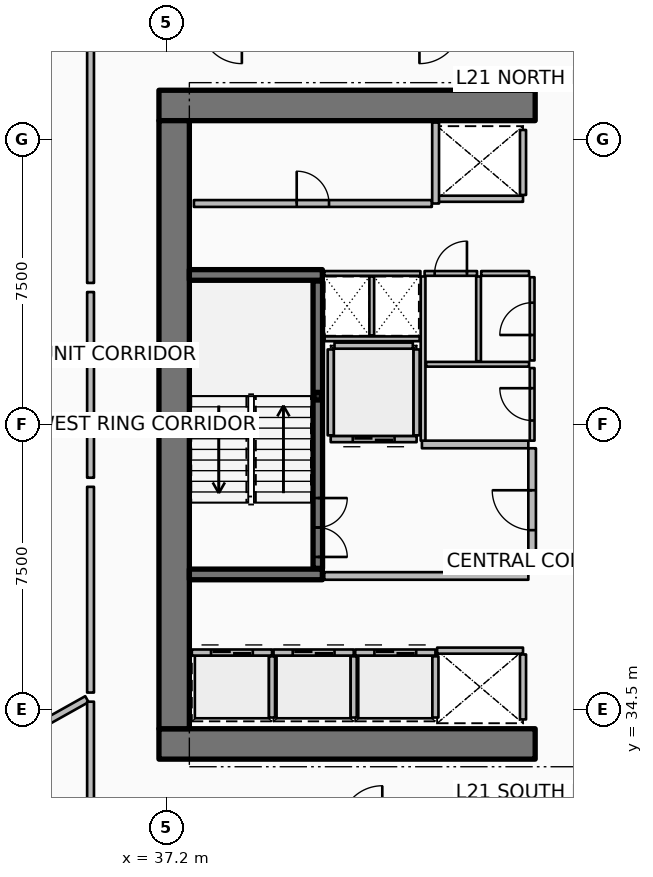
"""IFC4 building model, lengths in metres.
Left out: names, types, materials, properties, quantities, classifications, styles, units other than length and angle.
Written with IfcOpenShell. Run it as: python <this file> out.ifc"""

import sys

from ifc_helpers import new_model, si_unit, direction, frame, frame_2d, origin, origin_2d, place, context, subcontext, project, spatial, rectangle, hollow_rectangle, extrude, element, fill, save


model = new_model("IFC4")
c1 = context("Model", 3, precision=1e-05, world=origin(), true_north=direction((0.0, 1.0)))
c2 = subcontext(c1, "Body", "Model", "MODEL_VIEW")
j1 = project(units=[si_unit("LENGTHUNIT", "METRE"), si_unit("PLANEANGLEUNIT", "RADIAN")], contexts=[c1])
p1 = place(None, origin())
s1 = spatial("IfcSite", under=j1, at=p1, CompositionType="ELEMENT")
p2 = place(p1, origin())
s2 = spatial("IfcBuilding", under=s1, at=p2, CompositionType="ELEMENT")
p3 = place(p2, frame((0.0, 0.0, 86.4)))
s3 = spatial("IfcBuildingStorey", under=s2, at=p3, CompositionType="ELEMENT", Elevation=86.4)
for number, where, z_axis, x_axis in (
    (1, (37.0, 33.6, 0.0), (0.0, 0.0, 1.0), (1.0, 0.0, 0.0)),
    (2, (37.0, 50.4, 0.0), (0.0, 0.0, 1.0), (1.0, 0.0, 0.0)),
):
    element("IfcWall", number, at=place(p3, frame(where, z_axis=z_axis, x_axis=x_axis)), inside=s3, PredefinedType="SHEAR", context=c2, shape_type="SweptSolid", body=[
        extrude(rectangle(XDim=9.9, YDim=0.8, at=frame_2d((4.95, 0.0))), origin(), (0.0, 0.0, 1.0), 3.75),
    ])
p4 = place(p3, frame((37.4, 34.0, 0.0), z_axis=(0.0, 0.0, 1.0), x_axis=(0.0, 1.0, 0.0)))
e3 = element("IfcWall", 3, at=p4, inside=s3, PredefinedType="SHEAR", context=c2, shape_type="SweptSolid", body=[
    extrude(rectangle(XDim=16.0, YDim=0.8, at=frame_2d((8.0, 0.0))), origin(), (0.0, 0.0, 1.0), 3.75),
])
for number, where, z_axis, x_axis in (
    (4, (37.8, 38.06, 0.0), (0.0, 0.0, 1.0), (1.0, 0.0, 0.0)),
    (5, (37.8, 45.94, 0.0), (0.0, 0.0, 1.0), (1.0, 0.0, 0.0)),
):
    element("IfcWall", number, at=place(p3, frame(where, z_axis=z_axis, x_axis=x_axis)), inside=s3, PredefinedType="SHEAR", context=c2, shape_type="SweptSolid", body=[
        extrude(rectangle(XDim=3.5, YDim=0.28, at=frame_2d((1.75, 0.0))), origin(), (0.0, 0.0, 1.0), 3.75),
    ])
p5 = place(p3, frame((41.18, 42.75, 0.0), z_axis=(0.0, 0.0, 1.0), x_axis=(1.0, 0.0, 0.0)))
e6 = element("IfcColumn", 6, at=p5, inside=s3, PredefinedType="COLUMN", context=c2, shape_type="SweptSolid", body=[
    extrude(hollow_rectangle(XDim=0.2, YDim=0.2, WallThickness=0.01, InnerFilletRadius=0.01, OuterFilletRadius=0.02, at=origin_2d()), origin(), (0.0, 0.0, 1.0), 1.67),
])
p6 = place(p3, frame((41.18, 38.22, 0.0), z_axis=(0.0, 0.0, 1.0), x_axis=(0.0, 1.0, 0.0)))
e7 = element("IfcWall", 7, at=p6, inside=s3, PredefinedType="SOLIDWALL", context=c2, shape_type="SweptSolid", body=[
    extrude(rectangle(XDim=7.56, YDim=0.25, at=frame_2d((3.78, 0.0))), origin(), (0.0, 0.0, 1.0), 3.5),
])
p7 = place(p6, frame((0.3, 0.0, 0.0)))
e8 = element("IfcOpeningElement", 8, at=p7, cuts=e7, PredefinedType="OPENING", context=c2, shape_type="SweptSolid", body=[
    extrude(rectangle(XDim=1.55, YDim=2.15, at=frame_2d((0.775, 1.075))), frame((0.0, 0.135, 0.0), z_axis=(0.0, -1.0, 0.0), x_axis=(1.0, 0.0, 0.0)), (0.0, 0.0, 1.0), 0.27),
])
p8 = place(p3, frame((37.865, 36.005, 0.0), z_axis=(0.0, 0.0, 1.0), x_axis=(1.0, 0.0, 0.0)))
e9 = element("IfcWall", 9, at=p8, inside=s3, PredefinedType="PARTITIONING", context=c2, shape_type="SweptSolid", body=[
    extrude(rectangle(XDim=2.11, YDim=0.16, at=frame_2d((1.055, 0.0))), origin(), (0.0, 0.0, 1.0), 3.5),
])
p9 = place(p8, frame((0.505, 0.0, 0.0)))
e10 = element("IfcOpeningElement", 10, at=p9, cuts=e9, PredefinedType="OPENING", context=c2, shape_type="SweptSolid", body=[
    extrude(rectangle(XDim=1.1, YDim=2.1, at=frame_2d((0.55, 1.05))), frame((0.0, 0.09, 0.0), z_axis=(0.0, -1.0, 0.0), x_axis=(1.0, 0.0, 0.0)), (0.0, 0.0, 1.0), 0.18),
])
p10 = place(p3, frame((39.975, 34.295, 0.0), z_axis=(0.0, 0.0, 1.0), x_axis=(0.0, 1.0, 0.0)))
e11 = element("IfcWall", 11, at=p10, inside=s3, PredefinedType="PARTITIONING", context=c2, shape_type="SweptSolid", body=[
    extrude(rectangle(XDim=1.61, YDim=0.16, at=frame_2d((0.805, 0.0))), origin(), (0.0, 0.0, 1.0), 3.5),
])
p11 = place(p3, frame((40.015, 36.005, 0.0), z_axis=(0.0, 0.0, 1.0), x_axis=(1.0, 0.0, 0.0)))
e12 = element("IfcWall", 12, at=p11, inside=s3, PredefinedType="PARTITIONING", context=c2, shape_type="SweptSolid", body=[
    extrude(rectangle(XDim=2.11, YDim=0.16, at=frame_2d((1.055, 0.0))), origin(), (0.0, 0.0, 1.0), 3.5),
])
p12 = place(p11, frame((0.505, 0.0, 0.0)))
e13 = element("IfcOpeningElement", 13, at=p12, cuts=e12, PredefinedType="OPENING", context=c2, shape_type="SweptSolid", body=[
    extrude(rectangle(XDim=1.1, YDim=2.1, at=frame_2d((0.55, 1.05))), frame((0.0, 0.09, 0.0), z_axis=(0.0, -1.0, 0.0), x_axis=(1.0, 0.0, 0.0)), (0.0, 0.0, 1.0), 0.18),
])
p13 = place(p3, frame((42.125, 34.295, 0.0), z_axis=(0.0, 0.0, 1.0), x_axis=(0.0, 1.0, 0.0)))
e14 = element("IfcWall", 14, at=p13, inside=s3, PredefinedType="PARTITIONING", context=c2, shape_type="SweptSolid", body=[
    extrude(rectangle(XDim=1.61, YDim=0.16, at=frame_2d((0.805, 0.0))), origin(), (0.0, 0.0, 1.0), 3.5),
])
p14 = place(p3, frame((42.165, 36.005, 0.0), z_axis=(0.0, 0.0, 1.0), x_axis=(1.0, 0.0, 0.0)))
e15 = element("IfcWall", 15, at=p14, inside=s3, PredefinedType="PARTITIONING", context=c2, shape_type="SweptSolid", body=[
    extrude(rectangle(XDim=2.11, YDim=0.16, at=frame_2d((1.055, 0.0))), origin(), (0.0, 0.0, 1.0), 3.5),
])
p15 = place(p14, frame((0.505, 0.0, 0.0)))
e16 = element("IfcOpeningElement", 16, at=p15, cuts=e15, PredefinedType="OPENING", context=c2, shape_type="SweptSolid", body=[
    extrude(rectangle(XDim=1.1, YDim=2.1, at=frame_2d((0.55, 1.05))), frame((0.0, 0.09, 0.0), z_axis=(0.0, -1.0, 0.0), x_axis=(1.0, 0.0, 0.0)), (0.0, 0.0, 1.0), 0.18),
])
p16 = place(p3, frame((44.275, 34.295, 0.0), z_axis=(0.0, 0.0, 1.0), x_axis=(0.0, 1.0, 0.0)))
e17 = element("IfcWall", 17, at=p16, inside=s3, PredefinedType="PARTITIONING", context=c2, shape_type="SweptSolid", body=[
    extrude(rectangle(XDim=1.61, YDim=0.16, at=frame_2d((0.805, 0.0))), origin(), (0.0, 0.0, 1.0), 3.5),
])
p17 = place(p3, frame((46.58, 47.945, 0.0), z_axis=(0.0, 0.0, 1.0), x_axis=(-1.0, 0.0, 0.0)))
e18 = element("IfcWall", 18, at=p17, inside=s3, PredefinedType="PARTITIONING", context=c2, shape_type="SweptSolid", body=[
    extrude(rectangle(XDim=2.26, YDim=0.16, at=frame_2d((1.13, 0.0))), origin(), (0.0, 0.0, 1.0), 3.5),
])
p18 = place(p3, frame((46.58, 48.045, 0.0), z_axis=(0.0, 0.0, 1.0), x_axis=(0.0, 1.0, 0.0)))
e19 = element("IfcWall", 19, at=p18, inside=s3, PredefinedType="PARTITIONING", context=c2, shape_type="SweptSolid", body=[
    extrude(rectangle(XDim=1.71, YDim=0.16, at=frame_2d((0.855, 0.0))), origin(), (0.0, 0.0, 1.0), 3.5),
])
p19 = place(p3, frame((44.32, 36.055, 0.0), z_axis=(0.0, 0.0, 1.0), x_axis=(1.0, 0.0, 0.0)))
e20 = element("IfcWall", 20, at=p19, inside=s3, PredefinedType="PARTITIONING", context=c2, shape_type="SweptSolid", body=[
    extrude(rectangle(XDim=2.26, YDim=0.16, at=frame_2d((1.13, 0.0))), origin(), (0.0, 0.0, 1.0), 3.5),
])
p20 = place(p3, frame((46.58, 34.245, 0.0), z_axis=(0.0, 0.0, 1.0), x_axis=(0.0, 1.0, 0.0)))
e21 = element("IfcWall", 21, at=p20, inside=s3, PredefinedType="PARTITIONING", context=c2, shape_type="SweptSolid", body=[
    extrude(rectangle(XDim=1.71, YDim=0.16, at=frame_2d((0.855, 0.0))), origin(), (0.0, 0.0, 1.0), 3.5),
])
p21 = place(p3, frame((43.78, 41.62, 0.0), z_axis=(0.0, 0.0, 1.0), x_axis=(-1.0, 0.0, 0.0)))
e22 = element("IfcWall", 22, at=p21, inside=s3, PredefinedType="PARTITIONING", context=c2, shape_type="SweptSolid", body=[
    extrude(rectangle(XDim=2.26, YDim=0.16, at=frame_2d((1.13, 0.0))), origin(), (0.0, 0.0, 1.0), 3.5),
])
p22 = place(p21, frame((0.58, 0.0, 0.0)))
e23 = element("IfcOpeningElement", 23, at=p22, cuts=e22, PredefinedType="OPENING", context=c2, shape_type="SweptSolid", body=[
    extrude(rectangle(XDim=1.1, YDim=2.1, at=frame_2d((0.55, 1.05))), frame((0.0, 0.09, 0.0), z_axis=(0.0, -1.0, 0.0), x_axis=(1.0, 0.0, 0.0)), (0.0, 0.0, 1.0), 0.18),
])
for number, where, z_axis, x_axis in (
    (24, (43.78, 41.72, 0.0), (0.0, 0.0, 1.0), (0.0, 1.0, 0.0)),
    (25, (41.52, 41.72, 0.0), (0.0, 0.0, 1.0), (0.0, 1.0, 0.0)),
):
    element("IfcWall", number, at=place(p3, frame(where, z_axis=z_axis, x_axis=x_axis)), inside=s3, PredefinedType="PARTITIONING", context=c2, shape_type="SweptSolid", body=[
        extrude(rectangle(XDim=2.26, YDim=0.16, at=frame_2d((1.13, 0.0))), origin(), (0.0, 0.0, 1.0), 3.5),
    ])
p23 = place(p3, frame((41.62, 44.08, 0.0), z_axis=(0.0, 0.0, 1.0), x_axis=(1.0, 0.0, 0.0)))
e26 = element("IfcWall", 26, at=p23, inside=s3, PredefinedType="PARTITIONING", context=c2, shape_type="SweptSolid", body=[
    extrude(rectangle(XDim=2.06, YDim=0.16, at=frame_2d((1.03, 0.0))), origin(), (0.0, 0.0, 1.0), 3.5),
])
p24 = place(p3, frame((37.92, 47.82, 0.0), z_axis=(0.0, 0.0, 1.0), x_axis=(1.0, 0.0, 0.0)))
e27 = element("IfcWall", 27, at=p24, inside=s3, PredefinedType="PARTITIONING", context=c2, shape_type="SweptSolid", body=[
    extrude(rectangle(XDim=6.26, YDim=0.18, at=frame_2d((3.13, 0.0))), origin(), (0.0, 0.0, 1.0), 3.5),
])
p25 = place(p24, frame((2.705, 0.0, 0.0)))
e28 = element("IfcOpeningElement", 28, at=p25, cuts=e27, PredefinedType="OPENING", context=c2, shape_type="SweptSolid", body=[
    extrude(rectangle(XDim=0.85, YDim=2.06, at=frame_2d((0.425, 1.03))), frame((0.0, 0.1, 0.0), z_axis=(0.0, -1.0, 0.0), x_axis=(1.0, 0.0, 0.0)), (0.0, 0.0, 1.0), 0.2),
])
p26 = place(p3, frame((44.28, 47.82, 0.0), z_axis=(0.0, 0.0, 1.0), x_axis=(0.0, 1.0, 0.0)))
e29 = element("IfcWall", 29, at=p26, inside=s3, PredefinedType="PARTITIONING", context=c2, shape_type="SweptSolid", body=[
    extrude(rectangle(XDim=2.13, YDim=0.18, at=frame_2d((1.065, 0.0))), origin(), (0.0, 0.0, 1.0), 3.5),
])
p27 = place(p3, frame((41.35, 38.02, 0.0), z_axis=(0.0, 0.0, 1.0), x_axis=(1.0, 0.0, 0.0)))
e30 = element("IfcWall", 30, at=p27, inside=s3, PredefinedType="PARTITIONING", context=c2, shape_type="SweptSolid", body=[
    extrude(rectangle(XDim=5.37, YDim=0.2, at=frame_2d((2.685, 0.0))), origin(), (0.0, 0.0, 1.0), 3.5),
])
p28 = place(p3, frame((43.92, 41.48, 0.0), z_axis=(0.0, 0.0, 1.0), x_axis=(1.0, 0.0, 0.0)))
e31 = element("IfcWall", 31, at=p28, inside=s3, PredefinedType="PARTITIONING", context=c2, shape_type="SweptSolid", body=[
    extrude(rectangle(XDim=2.8, YDim=0.2, at=frame_2d((1.4, 0.0))), origin(), (0.0, 0.0, 1.0), 3.5),
])
p29 = place(p3, frame((46.82, 38.12, 0.0), z_axis=(0.0, 0.0, 1.0), x_axis=(0.0, 1.0, 0.0)))
e32 = element("IfcWall", 32, at=p29, inside=s3, PredefinedType="PARTITIONING", context=c2, shape_type="SweptSolid", body=[
    extrude(rectangle(XDim=3.26, YDim=0.2, at=frame_2d((1.63, 0.0))), origin(), (0.0, 0.0, 1.0), 3.5),
])
p30 = place(p29, frame((1.105, 0.0, 0.0)))
e33 = element("IfcOpeningElement", 33, at=p30, cuts=e32, PredefinedType="OPENING", context=c2, shape_type="SweptSolid", body=[
    extrude(rectangle(XDim=1.05, YDim=2.1, at=frame_2d((0.525, 1.05))), frame((0.0, 0.11, 0.0), z_axis=(0.0, -1.0, 0.0), x_axis=(1.0, 0.0, 0.0)), (0.0, 0.0, 1.0), 0.22),
])
p31 = place(p3, frame((41.36, 44.26, 0.0), z_axis=(0.0, 0.0, 1.0), x_axis=(1.0, 0.0, 0.0)))
e34 = element("IfcWall", 34, at=p31, inside=s3, PredefinedType="PARTITIONING", context=c2, shape_type="SweptSolid", body=[
    extrude(rectangle(XDim=2.5, YDim=0.125, at=frame_2d((1.25, 0.0))), origin(), (0.0, 0.0, 1.0), 2.94),
])
p32 = place(p3, frame((42.6, 44.35, 0.0), z_axis=(0.0, 0.0, 1.0), x_axis=(0.0, 1.0, 0.0)))
e35 = element("IfcWall", 35, at=p32, inside=s3, PredefinedType="PARTITIONING", context=c2, shape_type="SweptSolid", body=[
    extrude(rectangle(XDim=1.55, YDim=0.125, at=frame_2d((0.775, 0.0))), origin(), (0.0, 0.0, 1.0), 2.94),
])
p33 = place(p3, frame((43.95, 41.58, 0.0), z_axis=(0.0, 0.0, 1.0), x_axis=(0.0, 1.0, 0.0)))
e36 = element("IfcWall", 36, at=p33, inside=s3, PredefinedType="PARTITIONING", context=c2, shape_type="SweptSolid", body=[
    extrude(rectangle(XDim=4.32, YDim=0.125, at=frame_2d((2.16, 0.0))), origin(), (0.0, 0.0, 1.0), 2.94),
])
p34 = place(p3, frame((44.03, 43.59, 0.0), z_axis=(0.0, 0.0, 1.0), x_axis=(1.0, 0.0, 0.0)))
e37 = element("IfcWall", 37, at=p34, inside=s3, PredefinedType="PARTITIONING", context=c2, shape_type="SweptSolid", body=[
    extrude(rectangle(XDim=2.71, YDim=0.125, at=frame_2d((1.355, 0.0))), origin(), (0.0, 0.0, 1.0), 2.94),
])
p35 = place(p3, frame((45.41, 43.67, 0.0), z_axis=(0.0, 0.0, 1.0), x_axis=(0.0, 1.0, 0.0)))
e38 = element("IfcWall", 38, at=p35, inside=s3, PredefinedType="PARTITIONING", context=c2, shape_type="SweptSolid", body=[
    extrude(rectangle(XDim=2.23, YDim=0.125, at=frame_2d((1.115, 0.0))), origin(), (0.0, 0.0, 1.0), 2.94),
])
p36 = place(p3, frame((46.82, 41.58, 0.0), z_axis=(0.0, 0.0, 1.0), x_axis=(0.0, 1.0, 0.0)))
e39 = element("IfcWall", 39, at=p36, inside=s3, PredefinedType="PARTITIONING", context=c2, shape_type="SweptSolid", body=[
    extrude(rectangle(XDim=1.91, YDim=0.125, at=frame_2d((0.955, 0.0))), origin(), (0.0, 0.0, 1.0), 2.94),
])
p37 = place(p36, frame((0.53, 0.0, 0.0)))
e40 = element("IfcOpeningElement", 40, at=p37, cuts=e39, PredefinedType="OPENING", context=c2, shape_type="SweptSolid", body=[
    extrude(rectangle(XDim=0.85, YDim=2.06, at=frame_2d((0.425, 1.03))), frame((0.0, 0.073, 0.0), z_axis=(0.0, -1.0, 0.0), x_axis=(1.0, 0.0, 0.0)), (0.0, 0.0, 1.0), 0.145),
])
p38 = place(p3, frame((46.82, 43.69, 0.0), z_axis=(0.0, 0.0, 1.0), x_axis=(0.0, 1.0, 0.0)))
e41 = element("IfcWall", 41, at=p38, inside=s3, PredefinedType="PARTITIONING", context=c2, shape_type="SweptSolid", body=[
    extrude(rectangle(XDim=2.19, YDim=0.125, at=frame_2d((1.095, 0.0))), origin(), (0.0, 0.0, 1.0), 2.94),
])
p39 = place(p38, frame((0.67, 0.0, 0.0)))
e42 = element("IfcOpeningElement", 42, at=p39, cuts=e41, PredefinedType="OPENING", context=c2, shape_type="SweptSolid", body=[
    extrude(rectangle(XDim=0.85, YDim=2.06, at=frame_2d((0.425, 1.03))), frame((0.0, 0.073, 0.0), z_axis=(0.0, -1.0, 0.0), x_axis=(1.0, 0.0, 0.0)), (0.0, 0.0, 1.0), 0.145),
])
p40 = place(p3, frame((41.35, 45.98, 0.0), z_axis=(0.0, 0.0, 1.0), x_axis=(1.0, 0.0, 0.0)))
e43 = element("IfcWall", 43, at=p40, inside=s3, PredefinedType="PARTITIONING", context=c2, shape_type="SweptSolid", body=[
    extrude(rectangle(XDim=2.53, YDim=0.125, at=frame_2d((1.265, 0.0))), origin(), (0.0, 0.0, 1.0), 2.94),
])
p41 = place(p3, frame((43.99, 45.98, 0.0), z_axis=(0.0, 0.0, 1.0), x_axis=(1.0, 0.0, 0.0)))
e44 = element("IfcWall", 44, at=p41, inside=s3, PredefinedType="PARTITIONING", context=c2, shape_type="SweptSolid", body=[
    extrude(rectangle(XDim=1.38, YDim=0.125, at=frame_2d((0.69, 0.0))), origin(), (0.0, 0.0, 1.0), 2.94),
])
p42 = place(p41, frame((0.265, 0.0, 0.0)))
e45 = element("IfcOpeningElement", 45, at=p42, cuts=e44, PredefinedType="OPENING", context=c2, shape_type="SweptSolid", body=[
    extrude(rectangle(XDim=0.85, YDim=2.06, at=frame_2d((0.425, 1.03))), frame((0.0, 0.073, 0.0), z_axis=(0.0, -1.0, 0.0), x_axis=(1.0, 0.0, 0.0)), (0.0, 0.0, 1.0), 0.145),
])
p43 = place(p3, frame((45.48, 45.98, 0.0), z_axis=(0.0, 0.0, 1.0), x_axis=(1.0, 0.0, 0.0)))
e46 = element("IfcWall", 46, at=p43, inside=s3, PredefinedType="PARTITIONING", context=c2, shape_type="SweptSolid", body=[
    extrude(rectangle(XDim=1.26, YDim=0.125, at=frame_2d((0.63, 0.0))), origin(), (0.0, 0.0, 1.0), 2.94),
])
p44 = place(p3, frame((35.104, 34.778, 0.0), z_axis=(0.0, 0.0, 1.0), x_axis=(-0.872490437896, -0.488631185845, 0.0)))
e47 = element("IfcWall", 47, at=p44, inside=s3, PredefinedType="PARTITIONING", context=c2, shape_type="SweptSolid", body=[
    extrude(rectangle(XDim=14.699, YDim=0.18, at=frame_2d((7.35, 0.0))), origin(), (0.0, 0.0, 1.0), 2.94),
])
p45 = place(p3, frame((35.2, 51.971, 0.0), z_axis=(0.0, 0.0, 1.0), x_axis=(0.0, -1.0, 0.0)))
e48 = element("IfcWall", 48, at=p45, inside=s3, PredefinedType="PARTITIONING", context=c2, shape_type="SweptSolid", body=[
    extrude(rectangle(XDim=6.241, YDim=0.18, at=frame_2d((3.12, 0.0))), origin(), (0.0, 0.0, 1.0), 2.94),
])
p46 = place(p3, frame((35.2, 45.49, 0.0), z_axis=(0.0, 0.0, 1.0), x_axis=(0.0, -1.0, 0.0)))
e49 = element("IfcWall", 49, at=p46, inside=s3, PredefinedType="PARTITIONING", context=c2, shape_type="SweptSolid", body=[
    extrude(rectangle(XDim=4.885, YDim=0.18, at=frame_2d((2.442, 0.0))), origin(), (0.0, 0.0, 1.0), 2.94),
])
p47 = place(p3, frame((35.2, 40.365, 0.0), z_axis=(0.0, 0.0, 1.0), x_axis=(0.0, -1.0, 0.0)))
e50 = element("IfcWall", 50, at=p47, inside=s3, PredefinedType="PARTITIONING", context=c2, shape_type="SweptSolid", body=[
    extrude(rectangle(XDim=5.413, YDim=0.18, at=frame_2d((2.707, 0.0))), origin(), (0.0, 0.0, 1.0), 2.94),
])
p48 = place(p3, frame((35.2, 34.712, 0.0), z_axis=(0.0, 0.0, 1.0), x_axis=(0.0, -1.0, 0.0)))
e51 = element("IfcWall", 51, at=p48, inside=s3, PredefinedType="PARTITIONING", context=c2, shape_type="SweptSolid", body=[
    extrude(rectangle(XDim=3.192, YDim=0.18, at=frame_2d((1.596, 0.0))), origin(), (0.0, 0.0, 1.0), 2.94),
])
p49 = place(p7, origin())
e52 = element("IfcDoor", 52, at=p49, inside=s3, OperationType="DOUBLE_DOOR_SINGLE_SWING", PredefinedType="DOOR", context=c2, shape_type="SweptSolid", body=[
    extrude(rectangle(XDim=1.55, YDim=2.15, at=frame_2d((0.775, 1.075))), frame((0.0, 0.025, 0.0), z_axis=(0.0, -1.0, 0.0), x_axis=(1.0, 0.0, 0.0)), (0.0, 0.0, 1.0), 0.05),
])
fill(e8, e52)
p50 = place(p9, origin())
e53 = element("IfcDoor", 53, at=p50, inside=s3, OperationType="DOUBLE_DOOR_SLIDING", PredefinedType="DOOR", context=c2, shape_type="SweptSolid", body=[
    extrude(rectangle(XDim=1.1, YDim=2.1, at=frame_2d((0.55, 1.05))), frame((0.0, 0.025, 0.0), z_axis=(0.0, -1.0, 0.0), x_axis=(1.0, 0.0, 0.0)), (0.0, 0.0, 1.0), 0.05),
])
fill(e10, e53)
p51 = place(p12, origin())
e54 = element("IfcDoor", 54, at=p51, inside=s3, OperationType="DOUBLE_DOOR_SLIDING", PredefinedType="DOOR", context=c2, shape_type="SweptSolid", body=[
    extrude(rectangle(XDim=1.1, YDim=2.1, at=frame_2d((0.55, 1.05))), frame((0.0, 0.025, 0.0), z_axis=(0.0, -1.0, 0.0), x_axis=(1.0, 0.0, 0.0)), (0.0, 0.0, 1.0), 0.05),
])
fill(e13, e54)
p52 = place(p15, origin())
e55 = element("IfcDoor", 55, at=p52, inside=s3, OperationType="DOUBLE_DOOR_SLIDING", PredefinedType="DOOR", context=c2, shape_type="SweptSolid", body=[
    extrude(rectangle(XDim=1.1, YDim=2.1, at=frame_2d((0.55, 1.05))), frame((0.0, 0.025, 0.0), z_axis=(0.0, -1.0, 0.0), x_axis=(1.0, 0.0, 0.0)), (0.0, 0.0, 1.0), 0.05),
])
fill(e16, e55)
p53 = place(p22, origin())
e56 = element("IfcDoor", 56, at=p53, inside=s3, OperationType="DOUBLE_DOOR_SLIDING", PredefinedType="DOOR", context=c2, shape_type="SweptSolid", body=[
    extrude(rectangle(XDim=1.1, YDim=2.1, at=frame_2d((0.55, 1.05))), frame((0.0, 0.025, 0.0), z_axis=(0.0, -1.0, 0.0), x_axis=(1.0, 0.0, 0.0)), (0.0, 0.0, 1.0), 0.05),
])
fill(e23, e56)
p54 = place(p25, origin())
e57 = element("IfcDoor", 57, at=p54, inside=s3, OperationType="SINGLE_SWING_LEFT", PredefinedType="DOOR", context=c2, shape_type="SweptSolid", body=[
    extrude(rectangle(XDim=0.85, YDim=2.06, at=frame_2d((0.425, 1.03))), frame((0.0, 0.025, 0.0), z_axis=(0.0, -1.0, 0.0), x_axis=(1.0, 0.0, 0.0)), (0.0, 0.0, 1.0), 0.05),
])
fill(e28, e57)
p55 = place(p30, origin())
e58 = element("IfcDoor", 58, at=p55, inside=s3, OperationType="SINGLE_SWING_RIGHT", PredefinedType="DOOR", context=c2, shape_type="SweptSolid", body=[
    extrude(rectangle(XDim=1.05, YDim=2.1, at=frame_2d((0.525, 1.05))), frame((0.0, 0.025, 0.0), z_axis=(0.0, -1.0, 0.0), x_axis=(1.0, 0.0, 0.0)), (0.0, 0.0, 1.0), 0.05),
])
fill(e33, e58)
p56 = place(p37, origin())
e59 = element("IfcDoor", 59, at=p56, inside=s3, OperationType="SINGLE_SWING_RIGHT", PredefinedType="DOOR", context=c2, shape_type="SweptSolid", body=[
    extrude(rectangle(XDim=0.85, YDim=2.06, at=frame_2d((0.425, 1.03))), frame((0.0, 0.025, 0.0), z_axis=(0.0, -1.0, 0.0), x_axis=(1.0, 0.0, 0.0)), (0.0, 0.0, 1.0), 0.05),
])
fill(e40, e59)
p57 = place(p39, origin())
e60 = element("IfcDoor", 60, at=p57, inside=s3, OperationType="SINGLE_SWING_LEFT", PredefinedType="DOOR", context=c2, shape_type="SweptSolid", body=[
    extrude(rectangle(XDim=0.85, YDim=2.06, at=frame_2d((0.425, 1.03))), frame((0.0, 0.025, 0.0), z_axis=(0.0, -1.0, 0.0), x_axis=(1.0, 0.0, 0.0)), (0.0, 0.0, 1.0), 0.05),
])
fill(e42, e60)
p58 = place(p42, origin())
e61 = element("IfcDoor", 61, at=p58, inside=s3, OperationType="SINGLE_SWING_RIGHT", PredefinedType="DOOR", context=c2, shape_type="SweptSolid", body=[
    extrude(rectangle(XDim=0.85, YDim=2.06, at=frame_2d((0.425, 1.03))), frame((0.0, 0.025, 0.0), z_axis=(0.0, -1.0, 0.0), x_axis=(1.0, 0.0, 0.0)), (0.0, 0.0, 1.0), 0.05),
])
fill(e45, e61)
save(model, sys.argv[1])
